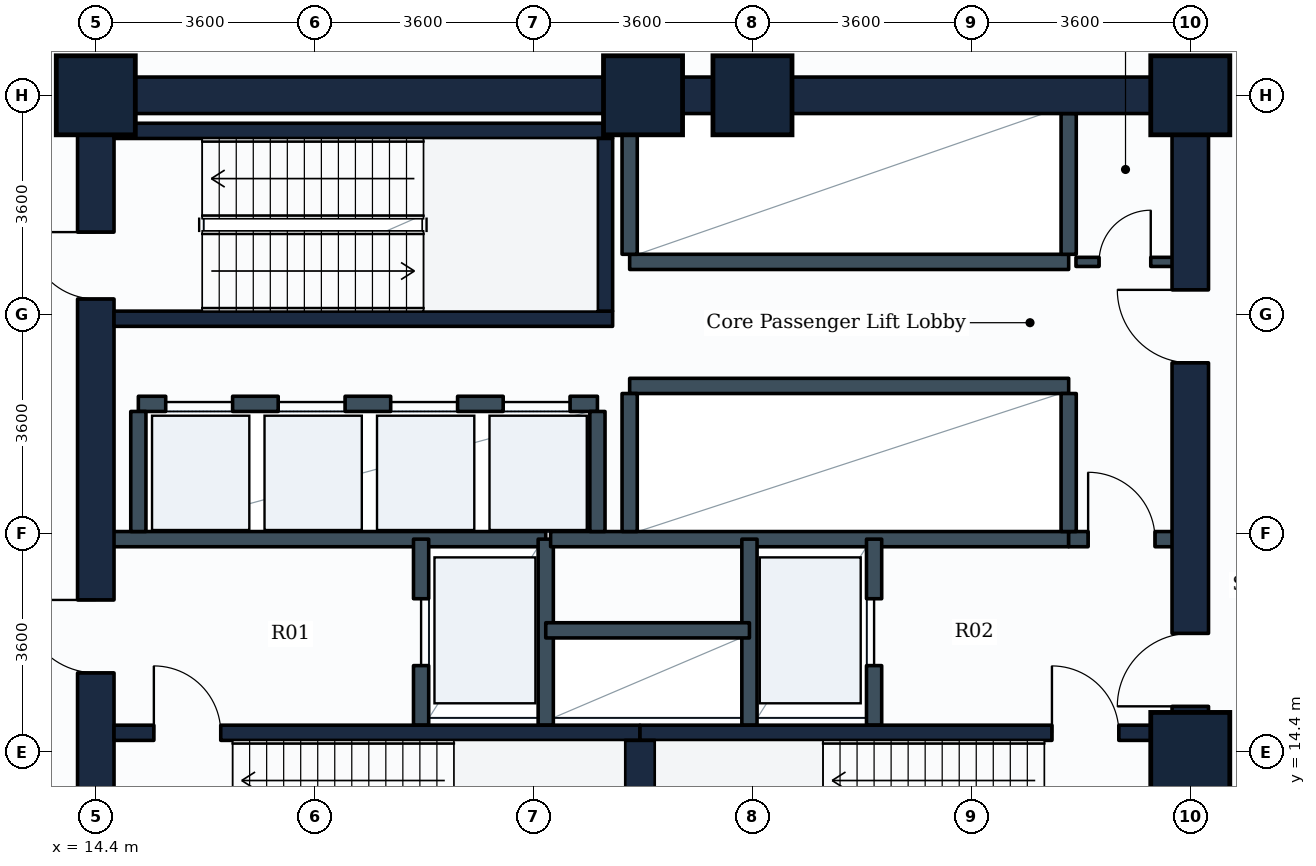
"""IFC4 building model, lengths in metres.
Left out: names, types, materials, properties, quantities, classifications, styles, units other than length and angle.
Written with IfcOpenShell. Run it as: python <this file> out.ifc"""

import sys

from ifc_helpers import new_model, si_unit, direction, frame, frame_2d, origin, origin_2d, place, context, subcontext, project, spatial, rectangle, extrude, element, fill, save


model = new_model("IFC4")
c1 = context("Model", 3, precision=1e-05, world=origin(), true_north=direction((0.0, 1.0)))
c2 = subcontext(c1, "Body", "Model", "MODEL_VIEW")
j1 = project(units=[si_unit("LENGTHUNIT", "METRE"), si_unit("PLANEANGLEUNIT", "RADIAN")], contexts=[c1])
p1 = place(None, origin())
s1 = spatial("IfcSite", under=j1, at=p1, CompositionType="ELEMENT")
p2 = place(p1, origin())
s2 = spatial("IfcBuilding", under=s1, at=p2, CompositionType="ELEMENT")
p3 = place(p2, frame((0.0, 0.0, 19.4)))
s3 = spatial("IfcBuildingStorey", under=s2, at=p3, CompositionType="ELEMENT", Elevation=19.4)
for number, where, z_axis, x_axis in (
    (1, (14.4, 25.2, 0.0), (0.0, 0.0, 1.0), (1.0, 0.0, 0.0)),
    (2, (23.4, 25.2, 0.0), (0.0, 0.0, 1.0), (1.0, 0.0, 0.0)),
    (3, (25.2, 25.2, 0.0), (0.0, 0.0, 1.0), (1.0, 0.0, 0.0)),
    (4, (32.4, 14.4, 0.0), (0.0, 0.0, 1.0), (1.0, 0.0, 0.0)),
    (5, (32.4, 25.2, 0.0), (0.0, 0.0, 1.0), (1.0, 0.0, 0.0)),
):
    element("IfcColumn", number, at=place(p3, frame(where, z_axis=z_axis, x_axis=x_axis)), inside=s3, PredefinedType="COLUMN", context=c2, shape_type="SweptSolid", body=[
        extrude(rectangle(XDim=1.3, YDim=1.3, at=origin_2d()), origin(), (0.0, 0.0, 1.0), 4.6),
    ])
p4 = place(p3, frame((14.4, 25.2, 0.0), z_axis=(0.0, 0.0, 1.0), x_axis=(1.0, 0.0, 0.0)))
e6 = element("IfcWall", 6, at=p4, inside=s3, PredefinedType="SHEAR", context=c2, shape_type="SweptSolid", body=[
    extrude(rectangle(XDim=18.0, YDim=0.6, at=frame_2d((9.0, 0.0))), origin(), (0.0, 0.0, 1.0), 4.2),
])
p5 = place(p3, frame((14.4, 10.8, 0.0), z_axis=(0.0, 0.0, 1.0), x_axis=(0.0, 1.0, 0.0)))
e7 = element("IfcWall", 7, at=p5, inside=s3, PredefinedType="SHEAR", context=c2, shape_type="SweptSolid", body=[
    extrude(rectangle(XDim=14.4, YDim=0.6, at=frame_2d((7.2, 0.0))), origin(), (0.0, 0.0, 1.0), 4.2),
])
p6 = place(p5, frame((11.05, 0.0, 0.0)))
e8 = element("IfcOpeningElement", 8, at=p6, cuts=e7, PredefinedType="OPENING", context=c2, shape_type="SweptSolid", body=[
    extrude(rectangle(XDim=1.1, YDim=2.1, at=frame_2d((0.55, 1.05))), frame((0.0, 0.31, 0.0), z_axis=(0.0, -1.0, 0.0), x_axis=(1.0, 0.0, 0.0)), (0.0, 0.0, 1.0), 0.62),
])
p7 = place(p5, frame((4.9, 0.0, 0.0)))
e9 = element("IfcOpeningElement", 9, at=p7, cuts=e7, PredefinedType="OPENING", context=c2, shape_type="SweptSolid", body=[
    extrude(rectangle(XDim=1.2, YDim=2.1, at=frame_2d((0.6, 1.05))), frame((0.0, 0.31, 0.0), z_axis=(0.0, -1.0, 0.0), x_axis=(1.0, 0.0, 0.0)), (0.0, 0.0, 1.0), 0.62),
])
p8 = place(p3, frame((32.4, 10.8, 0.0), z_axis=(0.0, 0.0, 1.0), x_axis=(0.0, 1.0, 0.0)))
e10 = element("IfcWall", 10, at=p8, inside=s3, PredefinedType="SHEAR", context=c2, shape_type="SweptSolid", body=[
    extrude(rectangle(XDim=14.4, YDim=0.6, at=frame_2d((7.2, 0.0))), origin(), (0.0, 0.0, 1.0), 4.2),
])
p9 = place(p8, frame((4.35, 0.0, 0.0)))
e11 = element("IfcOpeningElement", 11, at=p9, cuts=e10, PredefinedType="OPENING", context=c2, shape_type="SweptSolid", body=[
    extrude(rectangle(XDim=1.2, YDim=2.1, at=frame_2d((0.6, 1.05))), frame((0.0, 0.31, 0.0), z_axis=(0.0, -1.0, 0.0), x_axis=(1.0, 0.0, 0.0)), (0.0, 0.0, 1.0), 0.62),
])
p10 = place(p8, frame((10.0, 0.0, 0.0)))
e12 = element("IfcOpeningElement", 12, at=p10, cuts=e10, PredefinedType="OPENING", context=c2, shape_type="SweptSolid", body=[
    extrude(rectangle(XDim=1.2, YDim=2.1, at=frame_2d((0.6, 1.05))), frame((0.0, 0.31, 0.0), z_axis=(0.0, -1.0, 0.0), x_axis=(1.0, 0.0, 0.0)), (0.0, 0.0, 1.0), 0.62),
])
p11 = place(p3, frame((14.7, 14.715, 0.0), z_axis=(0.0, 0.0, 1.0), x_axis=(1.0, 0.0, 0.0)))
e13 = element("IfcWall", 13, at=p11, inside=s3, PredefinedType="SHEAR", context=c2, shape_type="SweptSolid", body=[
    extrude(rectangle(XDim=8.65, YDim=0.25, at=frame_2d((4.325, 0.0))), origin(), (0.0, 0.0, 1.0), 4.2),
])
p12 = place(p11, frame((0.655, 0.0, 0.0)))
e14 = element("IfcOpeningElement", 14, at=p12, cuts=e13, PredefinedType="OPENING", context=c2, shape_type="SweptSolid", body=[
    extrude(rectangle(XDim=1.1, YDim=2.1, at=frame_2d((0.55, 1.05))), frame((0.0, 0.135, 0.0), z_axis=(0.0, -1.0, 0.0), x_axis=(1.0, 0.0, 0.0)), (0.0, 0.0, 1.0), 0.27),
])
p13 = place(p3, frame((23.35, 14.715, 0.0), z_axis=(0.0, 0.0, 1.0), x_axis=(1.0, 0.0, 0.0)))
e15 = element("IfcWall", 15, at=p13, inside=s3, PredefinedType="SHEAR", context=c2, shape_type="SweptSolid", body=[
    extrude(rectangle(XDim=8.75, YDim=0.25, at=frame_2d((4.375, 0.0))), origin(), (0.0, 0.0, 1.0), 4.2),
])
p14 = place(p13, frame((6.775, 0.0, 0.0)))
e16 = element("IfcOpeningElement", 16, at=p14, cuts=e15, PredefinedType="OPENING", context=c2, shape_type="SweptSolid", body=[
    extrude(rectangle(XDim=1.1, YDim=2.1, at=frame_2d((0.55, 1.05))), frame((0.0, 0.135, 0.0), z_axis=(0.0, -1.0, 0.0), x_axis=(1.0, 0.0, 0.0)), (0.0, 0.0, 1.0), 0.27),
])
p15 = place(p3, frame((23.35, 11.75, 0.0), z_axis=(0.0, 0.0, 1.0), x_axis=(0.0, 1.0, 0.0)))
e17 = element("IfcWall", 17, at=p15, inside=s3, PredefinedType="SHEAR", context=c2, shape_type="SweptSolid", body=[
    extrude(rectangle(XDim=2.84, YDim=0.5, at=frame_2d((1.42, 0.0))), origin(), (0.0, 0.0, 1.0), 4.2),
])
for number, where, z_axis, x_axis in (
    (18, (14.7, 21.525, 0.0), (0.0, 0.0, 1.0), (1.0, 0.0, 0.0)),
    (19, (14.7, 24.615, 0.0), (0.0, 0.0, 1.0), (1.0, 0.0, 0.0)),
):
    element("IfcWall", number, at=place(p3, frame(where, z_axis=z_axis, x_axis=x_axis)), inside=s3, PredefinedType="SHEAR", context=c2, shape_type="SweptSolid", body=[
        extrude(rectangle(XDim=8.2, YDim=0.25, at=frame_2d((4.1, 0.0))), origin(), (0.0, 0.0, 1.0), 4.2),
    ])
p16 = place(p3, frame((22.775, 21.65, 0.0), z_axis=(0.0, 0.0, 1.0), x_axis=(0.0, 1.0, 0.0)))
e20 = element("IfcWall", 20, at=p16, inside=s3, PredefinedType="SHEAR", context=c2, shape_type="SweptSolid", body=[
    extrude(rectangle(XDim=2.84, YDim=0.25, at=frame_2d((1.42, 0.0))), origin(), (0.0, 0.0, 1.0), 4.2),
])
p17 = place(p3, frame((14.65, 17.9, 0.0), z_axis=(0.0, 0.0, 1.0), x_axis=(1.0, 0.0, 0.0)))
e21 = element("IfcWall", 21, at=p17, inside=s3, PredefinedType="PARTITIONING", context=c2, shape_type="SweptSolid", body=[
    extrude(rectangle(XDim=7.15, YDim=0.25, at=frame_2d((3.575, 0.0))), origin(), (0.0, 0.0, 1.0), 4.185),
])
p18 = place(p3, frame((19.75, 14.84, 0.0), z_axis=(0.0, 0.0, 1.0), x_axis=(0.0, 1.0, 0.0)))
e22 = element("IfcWall", 22, at=p18, inside=s3, PredefinedType="PARTITIONING", context=c2, shape_type="SweptSolid", body=[
    extrude(rectangle(XDim=3.06, YDim=0.25, at=frame_2d((1.53, 0.0))), origin(), (0.0, 0.0, 1.0), 4.185),
])
p19 = place(p18, frame((0.98, 0.0, 0.0)))
e23 = element("IfcOpeningElement", 23, at=p19, cuts=e22, PredefinedType="OPENING", context=c2, shape_type="SweptSolid", body=[
    extrude(rectangle(XDim=1.1, YDim=2.1, at=frame_2d((0.55, 1.05))), frame((0.0, 0.135, 0.0), z_axis=(0.0, -1.0, 0.0), x_axis=(1.0, 0.0, 0.0)), (0.0, 0.0, 1.0), 0.27),
])
p20 = place(p3, frame((21.8, 14.84, 0.0), z_axis=(0.0, 0.0, 1.0), x_axis=(0.0, 1.0, 0.0)))
e24 = element("IfcWall", 24, at=p20, inside=s3, PredefinedType="PARTITIONING", context=c2, shape_type="SweptSolid", body=[
    extrude(rectangle(XDim=3.06, YDim=0.25, at=frame_2d((1.53, 0.0))), origin(), (0.0, 0.0, 1.0), 4.185),
])
p21 = place(p3, frame((21.88, 17.9, 0.0), z_axis=(0.0, 0.0, 1.0), x_axis=(1.0, 0.0, 0.0)))
e25 = element("IfcWall", 25, at=p21, inside=s3, PredefinedType="PARTITIONING", context=c2, shape_type="SweptSolid", body=[
    extrude(rectangle(XDim=8.52, YDim=0.25, at=frame_2d((4.26, 0.0))), origin(), (0.0, 0.0, 1.0), 4.185),
])
p22 = place(p3, frame((30.4, 17.9, 0.0), z_axis=(0.0, 0.0, 1.0), x_axis=(1.0, 0.0, 0.0)))
e26 = element("IfcWall", 26, at=p22, inside=s3, PredefinedType="PARTITIONING", context=c2, shape_type="SweptSolid", body=[
    extrude(rectangle(XDim=1.75, YDim=0.25, at=frame_2d((0.875, 0.0))), origin(), (0.0, 0.0, 1.0), 4.185),
])
p23 = place(p22, frame((0.32, 0.0, 0.0)))
e27 = element("IfcOpeningElement", 27, at=p23, cuts=e26, PredefinedType="OPENING", context=c2, shape_type="SweptSolid", body=[
    extrude(rectangle(XDim=1.1, YDim=2.1, at=frame_2d((0.55, 1.05))), frame((0.0, 0.135, 0.0), z_axis=(0.0, -1.0, 0.0), x_axis=(1.0, 0.0, 0.0)), (0.0, 0.0, 1.0), 0.27),
])
p24 = place(p3, frame((25.15, 14.84, 0.0), z_axis=(0.0, 0.0, 1.0), x_axis=(0.0, 1.0, 0.0)))
e28 = element("IfcWall", 28, at=p24, inside=s3, PredefinedType="PARTITIONING", context=c2, shape_type="SweptSolid", body=[
    extrude(rectangle(XDim=3.06, YDim=0.25, at=frame_2d((1.53, 0.0))), origin(), (0.0, 0.0, 1.0), 4.185),
])
p25 = place(p3, frame((27.2, 14.84, 0.0), z_axis=(0.0, 0.0, 1.0), x_axis=(0.0, 1.0, 0.0)))
e29 = element("IfcWall", 29, at=p25, inside=s3, PredefinedType="PARTITIONING", context=c2, shape_type="SweptSolid", body=[
    extrude(rectangle(XDim=3.06, YDim=0.25, at=frame_2d((1.53, 0.0))), origin(), (0.0, 0.0, 1.0), 4.185),
])
p26 = place(p25, frame((0.98, 0.0, 0.0)))
e30 = element("IfcOpeningElement", 30, at=p26, cuts=e29, PredefinedType="OPENING", context=c2, shape_type="SweptSolid", body=[
    extrude(rectangle(XDim=1.1, YDim=2.1, at=frame_2d((0.55, 1.05))), frame((0.0, 0.135, 0.0), z_axis=(0.0, -1.0, 0.0), x_axis=(1.0, 0.0, 0.0)), (0.0, 0.0, 1.0), 0.27),
])
p27 = place(p3, frame((21.8, 16.4, 0.0), z_axis=(0.0, 0.0, 1.0), x_axis=(1.0, 0.0, 0.0)))
e31 = element("IfcWall", 31, at=p27, inside=s3, PredefinedType="PARTITIONING", context=c2, shape_type="SweptSolid", body=[
    extrude(rectangle(XDim=3.35, YDim=0.25, at=frame_2d((1.675, 0.0))), origin(), (0.0, 0.0, 1.0), 4.185),
])
p28 = place(p3, frame((15.1, 20.125, 0.0), z_axis=(0.0, 0.0, 1.0), x_axis=(1.0, 0.0, 0.0)))
e32 = element("IfcWall", 32, at=p28, inside=s3, PredefinedType="PARTITIONING", context=c2, shape_type="SweptSolid", body=[
    extrude(rectangle(XDim=7.55, YDim=0.25, at=frame_2d((3.775, 0.0))), origin(), (0.0, 0.0, 1.0), 4.185),
])
p29 = place(p28, frame((0.45, 0.0, 0.0)))
e33 = element("IfcOpeningElement", 33, at=p29, cuts=e32, PredefinedType="OPENING", context=c2, shape_type="SweptSolid", body=[
    extrude(rectangle(XDim=1.1, YDim=2.1, at=frame_2d((0.55, 1.05))), frame((0.0, 0.135, 0.0), z_axis=(0.0, -1.0, 0.0), x_axis=(1.0, 0.0, 0.0)), (0.0, 0.0, 1.0), 0.27),
])
p30 = place(p28, frame((2.3, 0.0, 0.0)))
e34 = element("IfcOpeningElement", 34, at=p30, cuts=e32, PredefinedType="OPENING", context=c2, shape_type="SweptSolid", body=[
    extrude(rectangle(XDim=1.1, YDim=2.1, at=frame_2d((0.55, 1.05))), frame((0.0, 0.135, 0.0), z_axis=(0.0, -1.0, 0.0), x_axis=(1.0, 0.0, 0.0)), (0.0, 0.0, 1.0), 0.27),
])
p31 = place(p28, frame((4.15, 0.0, 0.0)))
e35 = element("IfcOpeningElement", 35, at=p31, cuts=e32, PredefinedType="OPENING", context=c2, shape_type="SweptSolid", body=[
    extrude(rectangle(XDim=1.1, YDim=2.1, at=frame_2d((0.55, 1.05))), frame((0.0, 0.135, 0.0), z_axis=(0.0, -1.0, 0.0), x_axis=(1.0, 0.0, 0.0)), (0.0, 0.0, 1.0), 0.27),
])
p32 = place(p28, frame((6.0, 0.0, 0.0)))
e36 = element("IfcOpeningElement", 36, at=p32, cuts=e32, PredefinedType="OPENING", context=c2, shape_type="SweptSolid", body=[
    extrude(rectangle(XDim=1.1, YDim=2.1, at=frame_2d((0.55, 1.05))), frame((0.0, 0.135, 0.0), z_axis=(0.0, -1.0, 0.0), x_axis=(1.0, 0.0, 0.0)), (0.0, 0.0, 1.0), 0.27),
])
for number, where, z_axis, x_axis in (
    (37, (15.1, 18.025, 0.0), (0.0, 0.0, 1.0), (0.0, 1.0, 0.0)),
    (38, (22.65, 18.025, 0.0), (0.0, 0.0, 1.0), (0.0, 1.0, 0.0)),
):
    element("IfcWall", number, at=place(p3, frame(where, z_axis=z_axis, x_axis=x_axis)), inside=s3, PredefinedType="PARTITIONING", context=c2, shape_type="SweptSolid", body=[
        extrude(rectangle(XDim=1.975, YDim=0.25, at=frame_2d((0.988, 0.0))), origin(), (0.0, 0.0, 1.0), 4.185),
    ])
p33 = place(p3, frame((23.18, 20.42, 0.0), z_axis=(0.0, 0.0, 1.0), x_axis=(1.0, 0.0, 0.0)))
e39 = element("IfcWall", 39, at=p33, inside=s3, PredefinedType="PARTITIONING", context=c2, shape_type="SweptSolid", body=[
    extrude(rectangle(XDim=7.22, YDim=0.25, at=frame_2d((3.61, 0.0))), origin(), (0.0, 0.0, 1.0), 4.185),
])
for number, where, z_axis, x_axis in (
    (40, (23.18, 18.025, 0.0), (0.0, 0.0, 1.0), (0.0, 1.0, 0.0)),
    (41, (30.4, 18.025, 0.0), (0.0, 0.0, 1.0), (0.0, 1.0, 0.0)),
):
    element("IfcWall", number, at=place(p3, frame(where, z_axis=z_axis, x_axis=x_axis)), inside=s3, PredefinedType="PARTITIONING", context=c2, shape_type="SweptSolid", body=[
        extrude(rectangle(XDim=2.27, YDim=0.25, at=frame_2d((1.135, 0.0))), origin(), (0.0, 0.0, 1.0), 4.185),
    ])
p34 = place(p3, frame((23.18, 22.46, 0.0), z_axis=(0.0, 0.0, 1.0), x_axis=(1.0, 0.0, 0.0)))
e42 = element("IfcWall", 42, at=p34, inside=s3, PredefinedType="PARTITIONING", context=c2, shape_type="SweptSolid", body=[
    extrude(rectangle(XDim=7.22, YDim=0.25, at=frame_2d((3.61, 0.0))), origin(), (0.0, 0.0, 1.0), 4.185),
])
for number, where, z_axis, x_axis in (
    (43, (23.18, 22.585, 0.0), (0.0, 0.0, 1.0), (0.0, 1.0, 0.0)),
    (44, (30.4, 22.585, 0.0), (0.0, 0.0, 1.0), (0.0, 1.0, 0.0)),
):
    element("IfcWall", number, at=place(p3, frame(where, z_axis=z_axis, x_axis=x_axis)), inside=s3, PredefinedType="PARTITIONING", context=c2, shape_type="SweptSolid", body=[
        extrude(rectangle(XDim=2.315, YDim=0.25, at=frame_2d((1.157, 0.0))), origin(), (0.0, 0.0, 1.0), 3.23),
    ])
p35 = place(p3, frame((30.52, 22.46, 0.0), z_axis=(0.0, 0.0, 1.0), x_axis=(1.0, 0.0, 0.0)))
e45 = element("IfcWall", 45, at=p35, inside=s3, PredefinedType="PARTITIONING", context=c2, shape_type="SweptSolid", body=[
    extrude(rectangle(XDim=1.63, YDim=0.15, at=frame_2d((0.815, 0.0))), origin(), (0.0, 0.0, 1.0), 4.185),
])
p36 = place(p35, frame((0.38, 0.0, 0.0)))
e46 = element("IfcOpeningElement", 46, at=p36, cuts=e45, PredefinedType="OPENING", context=c2, shape_type="SweptSolid", body=[
    extrude(rectangle(XDim=0.85, YDim=2.1, at=frame_2d((0.425, 1.05))), frame((0.0, 0.085, 0.0), z_axis=(0.0, -1.0, 0.0), x_axis=(1.0, 0.0, 0.0)), (0.0, 0.0, 1.0), 0.17),
])
p37 = place(p12, origin())
e47 = element("IfcDoor", 47, at=p37, inside=s3, OperationType="SINGLE_SWING_LEFT", PredefinedType="DOOR", context=c2, shape_type="SweptSolid", body=[
    extrude(rectangle(XDim=1.1, YDim=2.1, at=frame_2d((0.55, 1.05))), frame((0.0, 0.025, 0.0), z_axis=(0.0, -1.0, 0.0), x_axis=(1.0, 0.0, 0.0)), (0.0, 0.0, 1.0), 0.05),
])
fill(e14, e47)
p38 = place(p14, origin())
e48 = element("IfcDoor", 48, at=p38, inside=s3, OperationType="SINGLE_SWING_LEFT", PredefinedType="DOOR", context=c2, shape_type="SweptSolid", body=[
    extrude(rectangle(XDim=1.1, YDim=2.1, at=frame_2d((0.55, 1.05))), frame((0.0, 0.025, 0.0), z_axis=(0.0, -1.0, 0.0), x_axis=(1.0, 0.0, 0.0)), (0.0, 0.0, 1.0), 0.05),
])
fill(e16, e48)
p39 = place(p6, origin())
e49 = element("IfcDoor", 49, at=p39, inside=s3, OperationType="SINGLE_SWING_RIGHT", PredefinedType="DOOR", context=c2, shape_type="SweptSolid", body=[
    extrude(rectangle(XDim=1.1, YDim=2.1, at=frame_2d((0.55, 1.05))), frame((0.0, 0.025, 0.0), z_axis=(0.0, -1.0, 0.0), x_axis=(1.0, 0.0, 0.0)), (0.0, 0.0, 1.0), 0.05),
])
fill(e8, e49)
p40 = place(p19, origin())
e50 = element("IfcDoor", 50, at=p40, inside=s3, OperationType="SLIDING_TO_LEFT", PredefinedType="DOOR", context=c2, shape_type="SweptSolid", body=[
    extrude(rectangle(XDim=1.1, YDim=2.1, at=frame_2d((0.55, 1.05))), frame((0.0, 0.025, 0.0), z_axis=(0.0, -1.0, 0.0), x_axis=(1.0, 0.0, 0.0)), (0.0, 0.0, 1.0), 0.05),
])
fill(e23, e50)
p41 = place(p26, origin())
e51 = element("IfcDoor", 51, at=p41, inside=s3, OperationType="SLIDING_TO_LEFT", PredefinedType="DOOR", context=c2, shape_type="SweptSolid", body=[
    extrude(rectangle(XDim=1.1, YDim=2.1, at=frame_2d((0.55, 1.05))), frame((0.0, 0.025, 0.0), z_axis=(0.0, -1.0, 0.0), x_axis=(1.0, 0.0, 0.0)), (0.0, 0.0, 1.0), 0.05),
])
fill(e30, e51)
p42 = place(p7, origin())
e52 = element("IfcDoor", 52, at=p42, inside=s3, OperationType="SINGLE_SWING_RIGHT", PredefinedType="DOOR", context=c2, shape_type="SweptSolid", body=[
    extrude(rectangle(XDim=1.2, YDim=2.1, at=frame_2d((0.6, 1.05))), frame((0.0, 0.025, 0.0), z_axis=(0.0, -1.0, 0.0), x_axis=(1.0, 0.0, 0.0)), (0.0, 0.0, 1.0), 0.05),
])
fill(e9, e52)
p43 = place(p9, origin())
e53 = element("IfcDoor", 53, at=p43, inside=s3, OperationType="SINGLE_SWING_LEFT", PredefinedType="DOOR", context=c2, shape_type="SweptSolid", body=[
    extrude(rectangle(XDim=1.2, YDim=2.1, at=frame_2d((0.6, 1.05))), frame((0.0, 0.025, 0.0), z_axis=(0.0, -1.0, 0.0), x_axis=(1.0, 0.0, 0.0)), (0.0, 0.0, 1.0), 0.05),
])
fill(e11, e53)
p44 = place(p23, origin())
e54 = element("IfcDoor", 54, at=p44, inside=s3, OperationType="SINGLE_SWING_LEFT", PredefinedType="DOOR", context=c2, shape_type="SweptSolid", body=[
    extrude(rectangle(XDim=1.1, YDim=2.1, at=frame_2d((0.55, 1.05))), frame((0.0, 0.025, 0.0), z_axis=(0.0, -1.0, 0.0), x_axis=(1.0, 0.0, 0.0)), (0.0, 0.0, 1.0), 0.05),
])
fill(e27, e54)
p45 = place(p29, origin())
e55 = element("IfcDoor", 55, at=p45, inside=s3, OperationType="SLIDING_TO_LEFT", PredefinedType="DOOR", context=c2, shape_type="SweptSolid", body=[
    extrude(rectangle(XDim=1.1, YDim=2.1, at=frame_2d((0.55, 1.05))), frame((0.0, 0.025, 0.0), z_axis=(0.0, -1.0, 0.0), x_axis=(1.0, 0.0, 0.0)), (0.0, 0.0, 1.0), 0.05),
])
fill(e33, e55)
p46 = place(p30, origin())
e56 = element("IfcDoor", 56, at=p46, inside=s3, OperationType="SLIDING_TO_LEFT", PredefinedType="DOOR", context=c2, shape_type="SweptSolid", body=[
    extrude(rectangle(XDim=1.1, YDim=2.1, at=frame_2d((0.55, 1.05))), frame((0.0, 0.025, 0.0), z_axis=(0.0, -1.0, 0.0), x_axis=(1.0, 0.0, 0.0)), (0.0, 0.0, 1.0), 0.05),
])
fill(e34, e56)
p47 = place(p31, origin())
e57 = element("IfcDoor", 57, at=p47, inside=s3, OperationType="SLIDING_TO_LEFT", PredefinedType="DOOR", context=c2, shape_type="SweptSolid", body=[
    extrude(rectangle(XDim=1.1, YDim=2.1, at=frame_2d((0.55, 1.05))), frame((0.0, 0.025, 0.0), z_axis=(0.0, -1.0, 0.0), x_axis=(1.0, 0.0, 0.0)), (0.0, 0.0, 1.0), 0.05),
])
fill(e35, e57)
p48 = place(p32, origin())
e58 = element("IfcDoor", 58, at=p48, inside=s3, OperationType="SLIDING_TO_LEFT", PredefinedType="DOOR", context=c2, shape_type="SweptSolid", body=[
    extrude(rectangle(XDim=1.1, YDim=2.1, at=frame_2d((0.55, 1.05))), frame((0.0, 0.025, 0.0), z_axis=(0.0, -1.0, 0.0), x_axis=(1.0, 0.0, 0.0)), (0.0, 0.0, 1.0), 0.05),
])
fill(e36, e58)
p49 = place(p10, origin())
e59 = element("IfcDoor", 59, at=p49, inside=s3, OperationType="SINGLE_SWING_RIGHT", PredefinedType="DOOR", context=c2, shape_type="SweptSolid", body=[
    extrude(rectangle(XDim=1.2, YDim=2.1, at=frame_2d((0.6, 1.05))), frame((0.0, 0.025, 0.0), z_axis=(0.0, -1.0, 0.0), x_axis=(1.0, 0.0, 0.0)), (0.0, 0.0, 1.0), 0.05),
])
fill(e12, e59)
p50 = place(p36, origin())
e60 = element("IfcDoor", 60, at=p50, inside=s3, OperationType="SINGLE_SWING_RIGHT", PredefinedType="DOOR", context=c2, shape_type="SweptSolid", body=[
    extrude(rectangle(XDim=0.85, YDim=2.1, at=frame_2d((0.425, 1.05))), frame((0.0, 0.025, 0.0), z_axis=(0.0, -1.0, 0.0), x_axis=(1.0, 0.0, 0.0)), (0.0, 0.0, 1.0), 0.05),
])
fill(e46, e60)
save(model, sys.argv[1])
